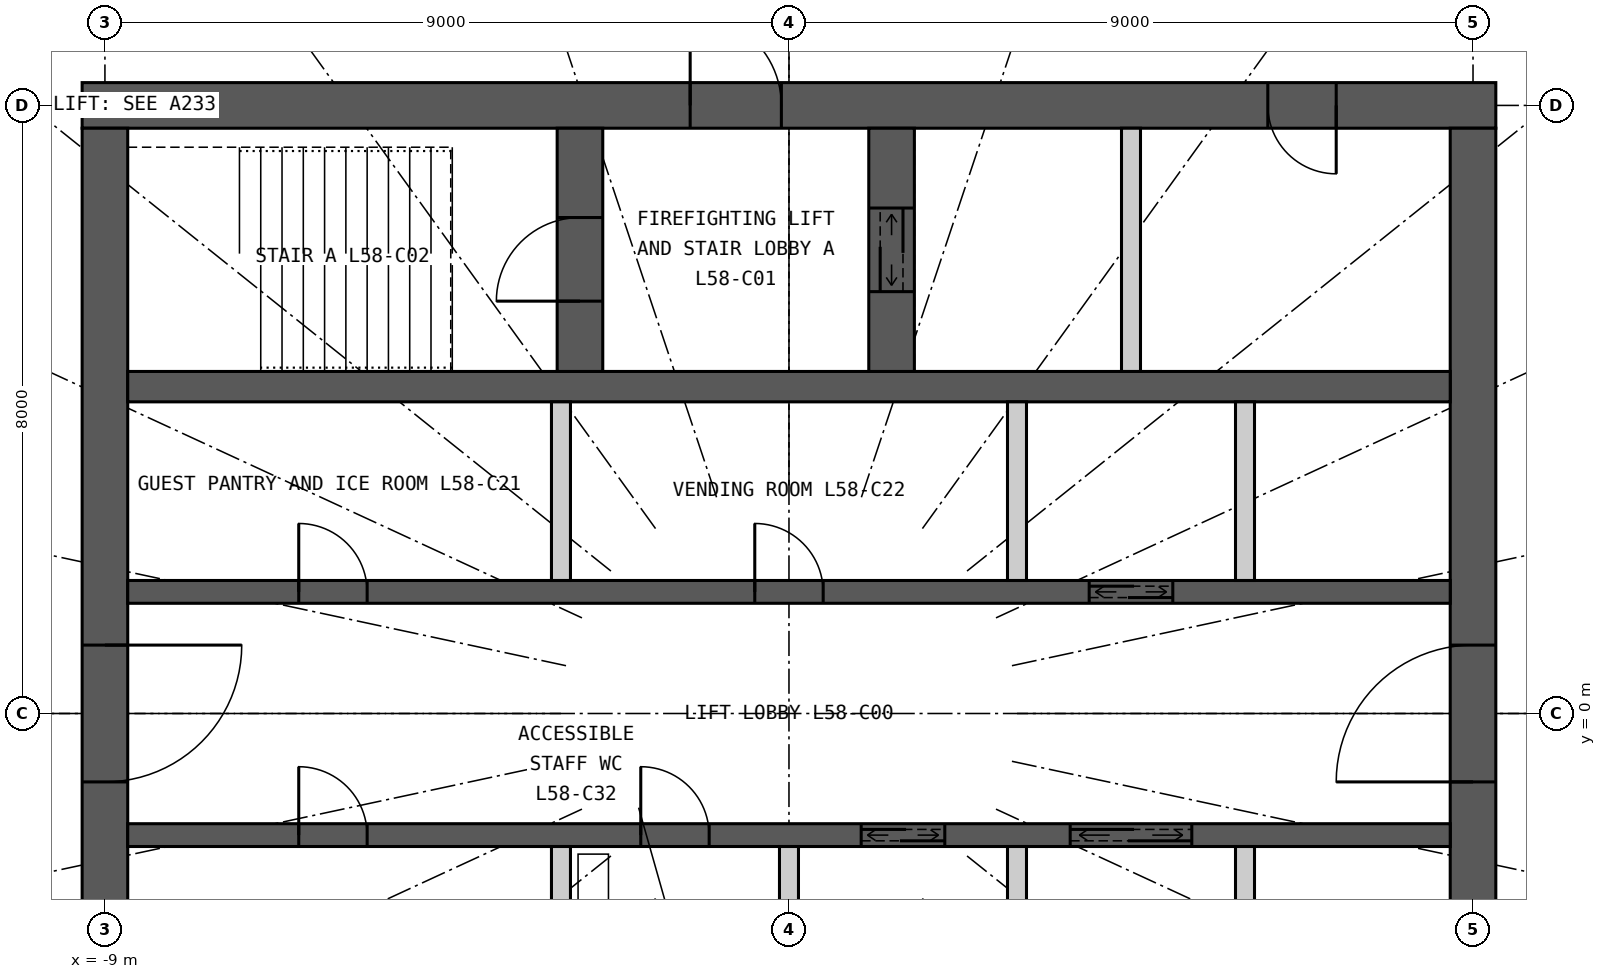
"""IFC4 building model, lengths in metres.
Left out: names, types, materials, properties, quantities, classifications, styles, units other than length and angle.
Written with IfcOpenShell. Run it as: python <this file> out.ifc"""

import sys

from ifc_helpers import new_model, si_unit, direction, frame, frame_2d, origin, place, context, subcontext, project, spatial, rectangle, extrude, element, fill, save


model = new_model("IFC4")
c1 = context("Model", 3, precision=1e-05, world=origin(), true_north=direction((0.0, 1.0)))
c2 = subcontext(c1, "Body", "Model", "MODEL_VIEW")
j1 = project(units=[si_unit("LENGTHUNIT", "METRE"), si_unit("PLANEANGLEUNIT", "RADIAN")], contexts=[c1])
p1 = place(None, origin())
s1 = spatial("IfcSite", under=j1, at=p1, CompositionType="ELEMENT")
p2 = place(p1, origin())
s2 = spatial("IfcBuilding", under=s1, at=p2, CompositionType="ELEMENT")
p3 = place(p2, frame((0.0, 0.0, 216.0)))
s3 = spatial("IfcBuildingStorey", under=s2, at=p3, CompositionType="ELEMENT", Elevation=216.0)
p4 = place(p3, frame((-9.3, 8.0, 0.0), z_axis=(0.0, 0.0, 1.0), x_axis=(1.0, 0.0, 0.0)))
e1 = element("IfcWall", 1, at=p4, inside=s3, PredefinedType="SHEAR", context=c2, shape_type="SweptSolid", body=[
    extrude(rectangle(XDim=18.6, YDim=0.6, at=frame_2d((9.3, 0.0))), origin(), (0.0, 0.0, 1.0), 3.3),
])
p5 = place(p4, frame((8.0, 0.0, 0.0)))
e2 = element("IfcOpeningElement", 2, at=p5, cuts=e1, PredefinedType="OPENING", context=c2, shape_type="SweptSolid", body=[
    extrude(rectangle(XDim=1.2, YDim=2.2, at=frame_2d((0.6, 1.1))), frame((0.0, 0.31, 0.0), z_axis=(0.0, -1.0, 0.0), x_axis=(1.0, 0.0, 0.0)), (0.0, 0.0, 1.0), 0.62),
])
p6 = place(p4, frame((15.6, 0.0, 0.0)))
e3 = element("IfcOpeningElement", 3, at=p6, cuts=e1, PredefinedType="OPENING", context=c2, shape_type="SweptSolid", body=[
    extrude(rectangle(XDim=0.9, YDim=2.2, at=frame_2d((0.45, 1.1))), frame((0.0, 0.31, 0.0), z_axis=(0.0, -1.0, 0.0), x_axis=(1.0, 0.0, 0.0)), (0.0, 0.0, 1.0), 0.62),
])
p7 = place(p3, frame((9.0, -7.7, 0.0), z_axis=(0.0, 0.0, 1.0), x_axis=(0.0, 1.0, 0.0)))
e4 = element("IfcWall", 4, at=p7, inside=s3, PredefinedType="SHEAR", context=c2, shape_type="SweptSolid", body=[
    extrude(rectangle(XDim=15.4, YDim=0.6, at=frame_2d((7.7, 0.0))), origin(), (0.0, 0.0, 1.0), 3.3),
])
p8 = place(p7, frame((6.8, 0.0, 0.0)))
e5 = element("IfcOpeningElement", 5, at=p8, cuts=e4, PredefinedType="OPENING", context=c2, shape_type="SweptSolid", body=[
    extrude(rectangle(XDim=1.8, YDim=2.2, at=frame_2d((0.9, 1.1))), frame((0.0, 0.31, 0.0), z_axis=(0.0, -1.0, 0.0), x_axis=(1.0, 0.0, 0.0)), (0.0, 0.0, 1.0), 0.62),
])
p9 = place(p3, frame((-9.0, 7.7, 0.0), z_axis=(0.0, 0.0, 1.0), x_axis=(0.0, -1.0, 0.0)))
e6 = element("IfcWall", 6, at=p9, inside=s3, PredefinedType="SHEAR", context=c2, shape_type="SweptSolid", body=[
    extrude(rectangle(XDim=15.4, YDim=0.6, at=frame_2d((7.7, 0.0))), origin(), (0.0, 0.0, 1.0), 3.3),
])
p10 = place(p9, frame((6.8, 0.0, 0.0)))
e7 = element("IfcOpeningElement", 7, at=p10, cuts=e6, PredefinedType="OPENING", context=c2, shape_type="SweptSolid", body=[
    extrude(rectangle(XDim=1.8, YDim=2.2, at=frame_2d((0.9, 1.1))), frame((0.0, 0.31, 0.0), z_axis=(0.0, -1.0, 0.0), x_axis=(1.0, 0.0, 0.0)), (0.0, 0.0, 1.0), 0.62),
])
p11 = place(p3, frame((-8.7, 4.3, 0.0), z_axis=(0.0, 0.0, 1.0), x_axis=(1.0, 0.0, 0.0)))
e8 = element("IfcWall", 8, at=p11, inside=s3, PredefinedType="SHEAR", context=c2, shape_type="SweptSolid", body=[
    extrude(rectangle(XDim=17.4, YDim=0.4, at=frame_2d((8.7, 0.0))), origin(), (0.0, 0.0, 1.0), 3.3),
])
p12 = place(p3, frame((-8.7, 1.6, 0.0), z_axis=(0.0, 0.0, 1.0), x_axis=(1.0, 0.0, 0.0)))
e9 = element("IfcWall", 9, at=p12, inside=s3, PredefinedType="SHEAR", context=c2, shape_type="SweptSolid", body=[
    extrude(rectangle(XDim=17.4, YDim=0.3, at=frame_2d((8.7, 0.0))), origin(), (0.0, 0.0, 1.0), 3.3),
])
p13 = place(p12, frame((12.65, 0.0, 0.0)))
e10 = element("IfcOpeningElement", 10, at=p13, cuts=e9, PredefinedType="OPENING", context=c2, shape_type="SweptSolid", body=[
    extrude(rectangle(XDim=1.1, YDim=2.2, at=frame_2d((0.55, 1.1))), frame((0.0, 0.16, 0.0), z_axis=(0.0, -1.0, 0.0), x_axis=(1.0, 0.0, 0.0)), (0.0, 0.0, 1.0), 0.32),
])
p14 = place(p12, frame((2.25, 0.0, 0.0)))
e11 = element("IfcOpeningElement", 11, at=p14, cuts=e9, PredefinedType="OPENING", context=c2, shape_type="SweptSolid", body=[
    extrude(rectangle(XDim=0.9, YDim=2.2, at=frame_2d((0.45, 1.1))), frame((0.0, 0.16, 0.0), z_axis=(0.0, -1.0, 0.0), x_axis=(1.0, 0.0, 0.0)), (0.0, 0.0, 1.0), 0.32),
])
p15 = place(p12, frame((8.25, 0.0, 0.0)))
e12 = element("IfcOpeningElement", 12, at=p15, cuts=e9, PredefinedType="OPENING", context=c2, shape_type="SweptSolid", body=[
    extrude(rectangle(XDim=0.9, YDim=2.2, at=frame_2d((0.45, 1.1))), frame((0.0, 0.16, 0.0), z_axis=(0.0, -1.0, 0.0), x_axis=(1.0, 0.0, 0.0)), (0.0, 0.0, 1.0), 0.32),
])
p16 = place(p3, frame((-8.7, -1.6, 0.0), z_axis=(0.0, 0.0, 1.0), x_axis=(1.0, 0.0, 0.0)))
e13 = element("IfcWall", 13, at=p16, inside=s3, PredefinedType="SHEAR", context=c2, shape_type="SweptSolid", body=[
    extrude(rectangle(XDim=17.4, YDim=0.3, at=frame_2d((8.7, 0.0))), origin(), (0.0, 0.0, 1.0), 3.3),
])
p17 = place(p16, frame((9.65, 0.0, 0.0)))
e14 = element("IfcOpeningElement", 14, at=p17, cuts=e13, PredefinedType="OPENING", context=c2, shape_type="SweptSolid", body=[
    extrude(rectangle(XDim=1.1, YDim=2.2, at=frame_2d((0.55, 1.1))), frame((0.0, 0.16, 0.0), z_axis=(0.0, -1.0, 0.0), x_axis=(1.0, 0.0, 0.0)), (0.0, 0.0, 1.0), 0.32),
])
p18 = place(p16, frame((12.4, 0.0, 0.0)))
e15 = element("IfcOpeningElement", 15, at=p18, cuts=e13, PredefinedType="OPENING", context=c2, shape_type="SweptSolid", body=[
    extrude(rectangle(XDim=1.6, YDim=2.4, at=frame_2d((0.8, 1.2))), frame((0.0, 0.16, 0.0), z_axis=(0.0, -1.0, 0.0), x_axis=(1.0, 0.0, 0.0)), (0.0, 0.0, 1.0), 0.32),
])
p19 = place(p16, frame((2.25, 0.0, 0.0)))
e16 = element("IfcOpeningElement", 16, at=p19, cuts=e13, PredefinedType="OPENING", context=c2, shape_type="SweptSolid", body=[
    extrude(rectangle(XDim=0.9, YDim=2.2, at=frame_2d((0.45, 1.1))), frame((0.0, 0.16, 0.0), z_axis=(0.0, -1.0, 0.0), x_axis=(1.0, 0.0, 0.0)), (0.0, 0.0, 1.0), 0.32),
])
p20 = place(p16, frame((6.75, 0.0, 0.0)))
e17 = element("IfcOpeningElement", 17, at=p20, cuts=e13, PredefinedType="OPENING", context=c2, shape_type="SweptSolid", body=[
    extrude(rectangle(XDim=0.9, YDim=2.2, at=frame_2d((0.45, 1.1))), frame((0.0, 0.16, 0.0), z_axis=(0.0, -1.0, 0.0), x_axis=(1.0, 0.0, 0.0)), (0.0, 0.0, 1.0), 0.32),
])
p21 = place(p3, frame((-2.75, 4.5, 0.0), z_axis=(0.0, 0.0, 1.0), x_axis=(0.0, 1.0, 0.0)))
e18 = element("IfcWall", 18, at=p21, inside=s3, PredefinedType="SHEAR", context=c2, shape_type="SweptSolid", body=[
    extrude(rectangle(XDim=3.2, YDim=0.6, at=frame_2d((1.6, 0.0))), origin(), (0.0, 0.0, 1.0), 3.3),
])
p22 = place(p21, frame((0.925, 0.0, 0.0)))
e19 = element("IfcOpeningElement", 19, at=p22, cuts=e18, PredefinedType="OPENING", context=c2, shape_type="SweptSolid", body=[
    extrude(rectangle(XDim=1.1, YDim=2.2, at=frame_2d((0.55, 1.1))), frame((0.0, 0.31, 0.0), z_axis=(0.0, -1.0, 0.0), x_axis=(1.0, 0.0, 0.0)), (0.0, 0.0, 1.0), 0.62),
])
p23 = place(p3, frame((1.35, 4.5, 0.0), z_axis=(0.0, 0.0, 1.0), x_axis=(0.0, 1.0, 0.0)))
e20 = element("IfcWall", 20, at=p23, inside=s3, PredefinedType="SHEAR", context=c2, shape_type="SweptSolid", body=[
    extrude(rectangle(XDim=3.2, YDim=0.6, at=frame_2d((1.6, 0.0))), origin(), (0.0, 0.0, 1.0), 3.3),
])
p24 = place(p23, frame((1.05, 0.0, 0.0)))
e21 = element("IfcOpeningElement", 21, at=p24, cuts=e20, PredefinedType="OPENING", context=c2, shape_type="SweptSolid", body=[
    extrude(rectangle(XDim=1.1, YDim=2.2, at=frame_2d((0.55, 1.1))), frame((0.0, 0.31, 0.0), z_axis=(0.0, -1.0, 0.0), x_axis=(1.0, 0.0, 0.0)), (0.0, 0.0, 1.0), 0.62),
])
p25 = place(p3, frame((4.5, 4.5, 0.0), z_axis=(0.0, 0.0, 1.0), x_axis=(0.0, 1.0, 0.0)))
e22 = element("IfcWall", 22, at=p25, inside=s3, PredefinedType="PARTITIONING", context=c2, shape_type="SweptSolid", body=[
    extrude(rectangle(XDim=3.2, YDim=0.25, at=frame_2d((1.6, 0.0))), origin(), (0.0, 0.0, 1.0), 3.3),
])
for number, where, z_axis, x_axis in (
    (23, (-3.0, 1.75, 0.0), (0.0, 0.0, 1.0), (0.0, 1.0, 0.0)),
    (24, (3.0, 1.75, 0.0), (0.0, 0.0, 1.0), (0.0, 1.0, 0.0)),
    (25, (6.0, 1.75, 0.0), (0.0, 0.0, 1.0), (0.0, 1.0, 0.0)),
    (26, (-3.0, -4.1, 0.0), (0.0, 0.0, 1.0), (0.0, 1.0, 0.0)),
    (27, (0.0, -4.1, 0.0), (0.0, 0.0, 1.0), (0.0, 1.0, 0.0)),
    (28, (3.0, -4.1, 0.0), (0.0, 0.0, 1.0), (0.0, 1.0, 0.0)),
    (29, (6.0, -4.1, 0.0), (0.0, 0.0, 1.0), (0.0, 1.0, 0.0)),
):
    element("IfcWall", number, at=place(p3, frame(where, z_axis=z_axis, x_axis=x_axis)), inside=s3, PredefinedType="PARTITIONING", context=c2, shape_type="SweptSolid", body=[
        extrude(rectangle(XDim=2.35, YDim=0.25, at=frame_2d((1.175, 0.0))), origin(), (0.0, 0.0, 1.0), 3.3),
    ])
p26 = place(p5, origin())
e30 = element("IfcDoor", 30, at=p26, inside=s3, OperationType="SINGLE_SWING_LEFT", PredefinedType="DOOR", context=c2, shape_type="SweptSolid", body=[
    extrude(rectangle(XDim=1.2, YDim=2.2, at=frame_2d((0.6, 1.1))), frame((0.0, 0.025, 0.0), z_axis=(0.0, -1.0, 0.0), x_axis=(1.0, 0.0, 0.0)), (0.0, 0.0, 1.0), 0.05),
])
fill(e2, e30)
p27 = place(p22, origin())
e31 = element("IfcDoor", 31, at=p27, inside=s3, OperationType="SINGLE_SWING_LEFT", PredefinedType="DOOR", context=c2, shape_type="SweptSolid", body=[
    extrude(rectangle(XDim=1.1, YDim=2.2, at=frame_2d((0.55, 1.1))), frame((0.0, 0.025, 0.0), z_axis=(0.0, -1.0, 0.0), x_axis=(1.0, 0.0, 0.0)), (0.0, 0.0, 1.0), 0.05),
])
fill(e19, e31)
p28 = place(p24, origin())
e32 = element("IfcDoor", 32, at=p28, inside=s3, OperationType="DOUBLE_DOOR_SLIDING", PredefinedType="DOOR", context=c2, shape_type="SweptSolid", body=[
    extrude(rectangle(XDim=1.1, YDim=2.2, at=frame_2d((0.55, 1.1))), frame((0.0, 0.025, 0.0), z_axis=(0.0, -1.0, 0.0), x_axis=(1.0, 0.0, 0.0)), (0.0, 0.0, 1.0), 0.05),
])
fill(e21, e32)
p29 = place(p6, origin())
e33 = element("IfcDoor", 33, at=p29, inside=s3, OperationType="SINGLE_SWING_RIGHT", PredefinedType="DOOR", context=c2, shape_type="SweptSolid", body=[
    extrude(rectangle(XDim=0.9, YDim=2.2, at=frame_2d((0.45, 1.1))), frame((0.0, 0.025, 0.0), z_axis=(0.0, -1.0, 0.0), x_axis=(1.0, 0.0, 0.0)), (0.0, 0.0, 1.0), 0.05),
])
fill(e3, e33)
p30 = place(p13, origin())
e34 = element("IfcDoor", 34, at=p30, inside=s3, OperationType="DOUBLE_DOOR_SLIDING", PredefinedType="DOOR", context=c2, shape_type="SweptSolid", body=[
    extrude(rectangle(XDim=1.1, YDim=2.2, at=frame_2d((0.55, 1.1))), frame((0.0, 0.025, 0.0), z_axis=(0.0, -1.0, 0.0), x_axis=(1.0, 0.0, 0.0)), (0.0, 0.0, 1.0), 0.05),
])
fill(e10, e34)
p31 = place(p17, origin())
e35 = element("IfcDoor", 35, at=p31, inside=s3, OperationType="DOUBLE_DOOR_SLIDING", PredefinedType="DOOR", context=c2, shape_type="SweptSolid", body=[
    extrude(rectangle(XDim=1.1, YDim=2.2, at=frame_2d((0.55, 1.1))), frame((0.0, 0.025, 0.0), z_axis=(0.0, -1.0, 0.0), x_axis=(1.0, 0.0, 0.0)), (0.0, 0.0, 1.0), 0.05),
])
fill(e14, e35)
p32 = place(p18, origin())
e36 = element("IfcDoor", 36, at=p32, inside=s3, OperationType="DOUBLE_DOOR_SLIDING", PredefinedType="DOOR", context=c2, shape_type="SweptSolid", body=[
    extrude(rectangle(XDim=1.6, YDim=2.4, at=frame_2d((0.8, 1.2))), frame((0.0, 0.025, 0.0), z_axis=(0.0, -1.0, 0.0), x_axis=(1.0, 0.0, 0.0)), (0.0, 0.0, 1.0), 0.05),
])
fill(e15, e36)
p33 = place(p14, origin())
e37 = element("IfcDoor", 37, at=p33, inside=s3, OperationType="SINGLE_SWING_LEFT", PredefinedType="DOOR", context=c2, shape_type="SweptSolid", body=[
    extrude(rectangle(XDim=0.9, YDim=2.2, at=frame_2d((0.45, 1.1))), frame((0.0, 0.025, 0.0), z_axis=(0.0, -1.0, 0.0), x_axis=(1.0, 0.0, 0.0)), (0.0, 0.0, 1.0), 0.05),
])
fill(e11, e37)
p34 = place(p15, origin())
e38 = element("IfcDoor", 38, at=p34, inside=s3, OperationType="SINGLE_SWING_LEFT", PredefinedType="DOOR", context=c2, shape_type="SweptSolid", body=[
    extrude(rectangle(XDim=0.9, YDim=2.2, at=frame_2d((0.45, 1.1))), frame((0.0, 0.025, 0.0), z_axis=(0.0, -1.0, 0.0), x_axis=(1.0, 0.0, 0.0)), (0.0, 0.0, 1.0), 0.05),
])
fill(e12, e38)
p35 = place(p19, origin())
e39 = element("IfcDoor", 39, at=p35, inside=s3, OperationType="SINGLE_SWING_LEFT", PredefinedType="DOOR", context=c2, shape_type="SweptSolid", body=[
    extrude(rectangle(XDim=0.9, YDim=2.2, at=frame_2d((0.45, 1.1))), frame((0.0, 0.025, 0.0), z_axis=(0.0, -1.0, 0.0), x_axis=(1.0, 0.0, 0.0)), (0.0, 0.0, 1.0), 0.05),
])
fill(e16, e39)
p36 = place(p20, origin())
e40 = element("IfcDoor", 40, at=p36, inside=s3, OperationType="SINGLE_SWING_LEFT", PredefinedType="DOOR", context=c2, shape_type="SweptSolid", body=[
    extrude(rectangle(XDim=0.9, YDim=2.2, at=frame_2d((0.45, 1.1))), frame((0.0, 0.025, 0.0), z_axis=(0.0, -1.0, 0.0), x_axis=(1.0, 0.0, 0.0)), (0.0, 0.0, 1.0), 0.05),
])
fill(e17, e40)
p37 = place(p8, origin())
e41 = element("IfcDoor", 41, at=p37, inside=s3, OperationType="DOUBLE_DOOR_DOUBLE_SWING", PredefinedType="DOOR", context=c2, shape_type="SweptSolid", body=[
    extrude(rectangle(XDim=1.8, YDim=2.2, at=frame_2d((0.9, 1.1))), frame((0.0, 0.025, 0.0), z_axis=(0.0, -1.0, 0.0), x_axis=(1.0, 0.0, 0.0)), (0.0, 0.0, 1.0), 0.05),
])
fill(e5, e41)
p38 = place(p10, origin())
e42 = element("IfcDoor", 42, at=p38, inside=s3, OperationType="DOUBLE_DOOR_DOUBLE_SWING", PredefinedType="DOOR", context=c2, shape_type="SweptSolid", body=[
    extrude(rectangle(XDim=1.8, YDim=2.2, at=frame_2d((0.9, 1.1))), frame((0.0, 0.025, 0.0), z_axis=(0.0, -1.0, 0.0), x_axis=(1.0, 0.0, 0.0)), (0.0, 0.0, 1.0), 0.05),
])
fill(e7, e42)
save(model, sys.argv[1])
